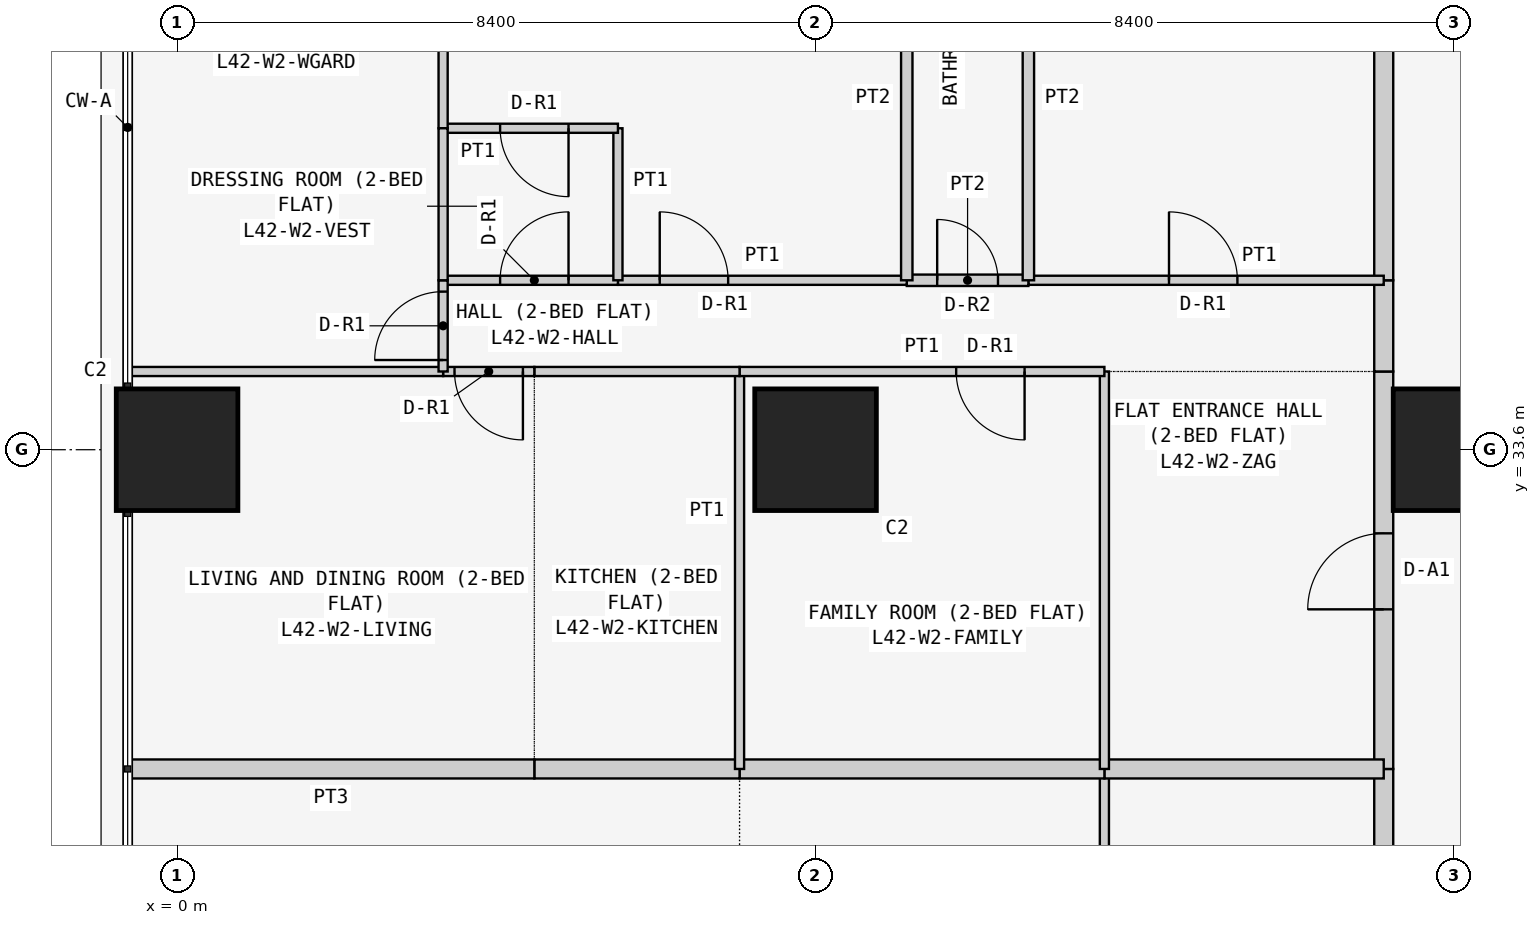
"""IFC4 building model, lengths in metres.
Left out: names, types, materials, properties, quantities, classifications, styles, units other than length and angle.
Written with IfcOpenShell. Run it as: python <this file> out.ifc"""

import sys

from ifc_helpers import new_model, si_unit, direction, frame, frame_2d, origin, origin_2d, place, context, subcontext, project, spatial, rectangle, extrude, element, fill, save


model = new_model("IFC4")
c1 = context("Model", 3, precision=1e-05, world=origin(), true_north=direction((0.0, 1.0)))
c2 = subcontext(c1, "Body", "Model", "MODEL_VIEW")
j1 = project(units=[si_unit("LENGTHUNIT", "METRE"), si_unit("PLANEANGLEUNIT", "RADIAN")], contexts=[c1])
p1 = place(None, origin())
s1 = spatial("IfcSite", under=j1, at=p1, CompositionType="ELEMENT")
p2 = place(p1, origin())
s2 = spatial("IfcBuilding", under=s1, at=p2, CompositionType="ELEMENT")
p3 = place(p2, frame((0.0, 0.0, 162.9)))
s3 = spatial("IfcBuildingStorey", under=s2, at=p3, CompositionType="ELEMENT", Elevation=162.9)
for number, where, z_axis, x_axis in (
    (1, (0.0, 33.6, 0.0), (0.0, 0.0, 1.0), (1.0, 0.0, 0.0)),
    (2, (8.4, 33.6, 0.0), (0.0, 0.0, 1.0), (1.0, 0.0, 0.0)),
    (3, (16.8, 33.6, 0.0), (0.0, 0.0, 1.0), (1.0, 0.0, 0.0)),
):
    element("IfcColumn", number, at=place(p3, frame(where, z_axis=z_axis, x_axis=x_axis)), inside=s3, PredefinedType="COLUMN", context=c2, shape_type="SweptSolid", body=[
        extrude(rectangle(XDim=1.6, YDim=1.6, at=origin_2d()), origin(), (0.0, 0.0, 1.0), 3.6),
    ])
p4 = place(p3, frame((15.875, 24.171, 0.0), z_axis=(0.0, 0.0, 1.0), x_axis=(0.0, 1.0, 0.0)))
e4 = element("IfcWall", 4, at=p4, inside=s3, PredefinedType="PARTITIONING", context=c2, shape_type="SweptSolid", body=[
    extrude(rectangle(XDim=5.229, YDim=0.25, at=frame_2d((2.615, 0.0))), origin(), (0.0, 0.0, 1.0), 3.45),
])
p5 = place(p4, frame((2.129, 0.0, 0.0)))
e5 = element("IfcOpeningElement", 5, at=p5, cuts=e4, PredefinedType="OPENING", context=c2, shape_type="SweptSolid", body=[
    extrude(rectangle(XDim=1.0, YDim=2.1, at=frame_2d((0.5, 1.05))), frame((0.0, 0.135, 0.0), z_axis=(0.0, -1.0, 0.0), x_axis=(1.0, 0.0, 0.0)), (0.0, 0.0, 1.0), 0.27),
])
p6 = place(p3, frame((15.875, 29.4, 0.0), z_axis=(0.0, 0.0, 1.0), x_axis=(0.0, 1.0, 0.0)))
e6 = element("IfcWall", 6, at=p6, inside=s3, PredefinedType="PARTITIONING", context=c2, shape_type="SweptSolid", body=[
    extrude(rectangle(XDim=5.229, YDim=0.25, at=frame_2d((2.615, 0.0))), origin(), (0.0, 0.0, 1.0), 3.45),
])
p7 = place(p6, frame((2.1, 0.0, 0.0)))
e7 = element("IfcOpeningElement", 7, at=p7, cuts=e6, PredefinedType="OPENING", context=c2, shape_type="SweptSolid", body=[
    extrude(rectangle(XDim=1.0, YDim=2.1, at=frame_2d((0.5, 1.05))), frame((0.0, 0.135, 0.0), z_axis=(0.0, -1.0, 0.0), x_axis=(1.0, 0.0, 0.0)), (0.0, 0.0, 1.0), 0.27),
])
p8 = place(p3, frame((15.875, 34.629, 0.0), z_axis=(0.0, 0.0, 1.0), x_axis=(0.0, 1.0, 0.0)))
e8 = element("IfcWall", 8, at=p8, inside=s3, PredefinedType="PARTITIONING", context=c2, shape_type="SweptSolid", body=[
    extrude(rectangle(XDim=1.2, YDim=0.25, at=frame_2d((0.6, 0.0))), origin(), (0.0, 0.0, 1.0), 3.45),
])
p9 = place(p3, frame((15.875, 35.829, 0.0), z_axis=(0.0, 0.0, 1.0), x_axis=(0.0, 1.0, 0.0)))
e9 = element("IfcWall", 9, at=p9, inside=s3, PredefinedType="PARTITIONING", context=c2, shape_type="SweptSolid", body=[
    extrude(rectangle(XDim=6.871, YDim=0.25, at=frame_2d((3.436, 0.0))), origin(), (0.0, 0.0, 1.0), 3.45),
])
p10 = place(p3, frame((12.2, 29.4, 0.0), z_axis=(0.0, 0.0, 1.0), x_axis=(0.0, -1.0, 0.0)))
e10 = element("IfcWall", 10, at=p10, inside=s3, PredefinedType="PARTITIONING", context=c2, shape_type="SweptSolid", body=[
    extrude(rectangle(XDim=5.229, YDim=0.12, at=frame_2d((2.615, 0.0))), origin(), (0.0, 0.0, 1.0), 3.45),
])
p11 = place(p10, frame((1.05, 0.0, 0.0)))
e11 = element("IfcOpeningElement", 11, at=p11, cuts=e10, PredefinedType="OPENING", context=c2, shape_type="SweptSolid", body=[
    extrude(rectangle(XDim=0.9, YDim=2.1, at=frame_2d((0.45, 1.05))), frame((0.0, 0.07, 0.0), z_axis=(0.0, -1.0, 0.0), x_axis=(1.0, 0.0, 0.0)), (0.0, 0.0, 1.0), 0.14),
])
p12 = place(p3, frame((15.875, 29.4, 0.0), z_axis=(0.0, 0.0, 1.0), x_axis=(-1.0, 0.0, 0.0)))
e12 = element("IfcWall", 12, at=p12, inside=s3, PredefinedType="PARTITIONING", context=c2, shape_type="SweptSolid", body=[
    extrude(rectangle(XDim=3.675, YDim=0.25, at=frame_2d((1.837, 0.0))), origin(), (0.0, 0.0, 1.0), 3.45),
])
p13 = place(p3, frame((12.2, 29.4, 0.0), z_axis=(0.0, 0.0, 1.0), x_axis=(-1.0, 0.0, 0.0)))
e13 = element("IfcWall", 13, at=p13, inside=s3, PredefinedType="PARTITIONING", context=c2, shape_type="SweptSolid", body=[
    extrude(rectangle(XDim=4.8, YDim=0.25, at=frame_2d((2.4, 0.0))), origin(), (0.0, 0.0, 1.0), 3.45),
])
p14 = place(p3, frame((7.4, 29.4, 0.0), z_axis=(0.0, 0.0, 1.0), x_axis=(-1.0, 0.0, 0.0)))
e14 = element("IfcWall", 14, at=p14, inside=s3, PredefinedType="PARTITIONING", context=c2, shape_type="SweptSolid", body=[
    extrude(rectangle(XDim=2.7, YDim=0.25, at=frame_2d((1.35, 0.0))), origin(), (0.0, 0.0, 1.0), 3.45),
])
p15 = place(p3, frame((4.7, 29.4, 0.0), z_axis=(0.0, 0.0, 1.0), x_axis=(-1.0, 0.0, 0.0)))
e15 = element("IfcWall", 15, at=p15, inside=s3, PredefinedType="PARTITIONING", context=c2, shape_type="SweptSolid", body=[
    extrude(rectangle(XDim=5.35, YDim=0.25, at=frame_2d((2.675, 0.0))), origin(), (0.0, 0.0, 1.0), 3.45),
])
for number, where, z_axis, x_axis in (
    (16, (12.2, 29.4, 0.0), (0.0, 0.0, 1.0), (0.0, 1.0, 0.0)),
    (17, (7.4, 29.4, 0.0), (0.0, 0.0, 1.0), (0.0, 1.0, 0.0)),
):
    element("IfcWall", number, at=place(p3, frame(where, z_axis=z_axis, x_axis=x_axis)), inside=s3, PredefinedType="PARTITIONING", context=c2, shape_type="SweptSolid", body=[
        extrude(rectangle(XDim=5.229, YDim=0.12, at=frame_2d((2.615, 0.0))), origin(), (0.0, 0.0, 1.0), 3.45),
    ])
p16 = place(p3, frame((7.4, 34.629, 0.0), z_axis=(0.0, 0.0, 1.0), x_axis=(1.0, 0.0, 0.0)))
e18 = element("IfcWall", 18, at=p16, inside=s3, PredefinedType="PARTITIONING", context=c2, shape_type="SweptSolid", body=[
    extrude(rectangle(XDim=4.8, YDim=0.12, at=frame_2d((2.4, 0.0))), origin(), (0.0, 0.0, 1.0), 3.45),
])
p17 = place(p16, frame((2.85, 0.0, 0.0)))
e19 = element("IfcOpeningElement", 19, at=p17, cuts=e18, PredefinedType="OPENING", context=c2, shape_type="SweptSolid", body=[
    extrude(rectangle(XDim=0.9, YDim=2.1, at=frame_2d((0.45, 1.05))), frame((0.0, 0.07, 0.0), z_axis=(0.0, -1.0, 0.0), x_axis=(1.0, 0.0, 0.0)), (0.0, 0.0, 1.0), 0.14),
])
p18 = place(p3, frame((4.7, 34.629, 0.0), z_axis=(0.0, 0.0, 1.0), x_axis=(1.0, 0.0, 0.0)))
e20 = element("IfcWall", 20, at=p18, inside=s3, PredefinedType="PARTITIONING", context=c2, shape_type="SweptSolid", body=[
    extrude(rectangle(XDim=2.7, YDim=0.12, at=frame_2d((1.35, 0.0))), origin(), (0.0, 0.0, 1.0), 3.45),
])
p19 = place(p3, frame((3.5, 34.629, 0.0), z_axis=(0.0, 0.0, 1.0), x_axis=(1.0, 0.0, 0.0)))
e21 = element("IfcWall", 21, at=p19, inside=s3, PredefinedType="PARTITIONING", context=c2, shape_type="SweptSolid", body=[
    extrude(rectangle(XDim=1.2, YDim=0.12, at=frame_2d((0.6, 0.0))), origin(), (0.0, 0.0, 1.0), 3.45),
])
p20 = place(p19, frame((0.15, 0.0, 0.0)))
e22 = element("IfcOpeningElement", 22, at=p20, cuts=e21, PredefinedType="OPENING", context=c2, shape_type="SweptSolid", body=[
    extrude(rectangle(XDim=0.9, YDim=2.1, at=frame_2d((0.45, 1.05))), frame((0.0, 0.07, 0.0), z_axis=(0.0, -1.0, 0.0), x_axis=(1.0, 0.0, 0.0)), (0.0, 0.0, 1.0), 0.14),
])
p21 = place(p3, frame((-0.65, 34.629, 0.0), z_axis=(0.0, 0.0, 1.0), x_axis=(1.0, 0.0, 0.0)))
e23 = element("IfcWall", 23, at=p21, inside=s3, PredefinedType="PARTITIONING", context=c2, shape_type="SweptSolid", body=[
    extrude(rectangle(XDim=4.15, YDim=0.12, at=frame_2d((2.075, 0.0))), origin(), (0.0, 0.0, 1.0), 3.45),
])
p22 = place(p3, frame((11.2, 35.829, 0.0), z_axis=(0.0, 0.0, 1.0), x_axis=(1.0, 0.0, 0.0)))
e24 = element("IfcWall", 24, at=p22, inside=s3, PredefinedType="PARTITIONING", context=c2, shape_type="SweptSolid", body=[
    extrude(rectangle(XDim=4.675, YDim=0.12, at=frame_2d((2.337, 0.0))), origin(), (0.0, 0.0, 1.0), 3.45),
])
p23 = place(p22, frame((1.85, 0.0, 0.0)))
e25 = element("IfcOpeningElement", 25, at=p23, cuts=e24, PredefinedType="OPENING", context=c2, shape_type="SweptSolid", body=[
    extrude(rectangle(XDim=0.9, YDim=2.1, at=frame_2d((0.45, 1.05))), frame((0.0, 0.07, 0.0), z_axis=(0.0, -1.0, 0.0), x_axis=(1.0, 0.0, 0.0)), (0.0, 0.0, 1.0), 0.14),
])
p24 = place(p3, frame((9.6, 35.829, 0.0), z_axis=(0.0, 0.0, 1.0), x_axis=(1.0, 0.0, 0.0)))
e26 = element("IfcWall", 26, at=p24, inside=s3, PredefinedType="PARTITIONING", context=c2, shape_type="SweptSolid", body=[
    extrude(rectangle(XDim=1.6, YDim=0.15, at=frame_2d((0.8, 0.0))), origin(), (0.0, 0.0, 1.0), 3.45),
])
p25 = place(p24, frame((0.4, 0.0, 0.0)))
e27 = element("IfcOpeningElement", 27, at=p25, cuts=e26, PredefinedType="OPENING", context=c2, shape_type="SweptSolid", body=[
    extrude(rectangle(XDim=0.8, YDim=2.1, at=frame_2d((0.4, 1.05))), frame((0.0, 0.085, 0.0), z_axis=(0.0, -1.0, 0.0), x_axis=(1.0, 0.0, 0.0)), (0.0, 0.0, 1.0), 0.17),
])
p26 = place(p3, frame((5.8, 35.829, 0.0), z_axis=(0.0, 0.0, 1.0), x_axis=(1.0, 0.0, 0.0)))
e28 = element("IfcWall", 28, at=p26, inside=s3, PredefinedType="PARTITIONING", context=c2, shape_type="SweptSolid", body=[
    extrude(rectangle(XDim=3.8, YDim=0.12, at=frame_2d((1.9, 0.0))), origin(), (0.0, 0.0, 1.0), 3.45),
])
p27 = place(p26, frame((0.55, 0.0, 0.0)))
e29 = element("IfcOpeningElement", 29, at=p27, cuts=e28, PredefinedType="OPENING", context=c2, shape_type="SweptSolid", body=[
    extrude(rectangle(XDim=0.9, YDim=2.1, at=frame_2d((0.45, 1.05))), frame((0.0, 0.07, 0.0), z_axis=(0.0, -1.0, 0.0), x_axis=(1.0, 0.0, 0.0)), (0.0, 0.0, 1.0), 0.14),
])
p28 = place(p3, frame((3.5, 35.829, 0.0), z_axis=(0.0, 0.0, 1.0), x_axis=(1.0, 0.0, 0.0)))
e30 = element("IfcWall", 30, at=p28, inside=s3, PredefinedType="PARTITIONING", context=c2, shape_type="SweptSolid", body=[
    extrude(rectangle(XDim=2.3, YDim=0.12, at=frame_2d((1.15, 0.0))), origin(), (0.0, 0.0, 1.0), 3.45),
])
p29 = place(p28, frame((0.75, 0.0, 0.0)))
e31 = element("IfcOpeningElement", 31, at=p29, cuts=e30, PredefinedType="OPENING", context=c2, shape_type="SweptSolid", body=[
    extrude(rectangle(XDim=0.9, YDim=2.1, at=frame_2d((0.45, 1.05))), frame((0.0, 0.07, 0.0), z_axis=(0.0, -1.0, 0.0), x_axis=(1.0, 0.0, 0.0)), (0.0, 0.0, 1.0), 0.14),
])
p30 = place(p3, frame((3.5, 34.629, 0.0), z_axis=(0.0, 0.0, 1.0), x_axis=(0.0, 1.0, 0.0)))
e32 = element("IfcWall", 32, at=p30, inside=s3, PredefinedType="PARTITIONING", context=c2, shape_type="SweptSolid", body=[
    extrude(rectangle(XDim=1.2, YDim=0.12, at=frame_2d((0.6, 0.0))), origin(), (0.0, 0.0, 1.0), 3.45),
])
p31 = place(p30, frame((0.151, 0.0, 0.0)))
e33 = element("IfcOpeningElement", 33, at=p31, cuts=e32, PredefinedType="OPENING", context=c2, shape_type="SweptSolid", body=[
    extrude(rectangle(XDim=0.9, YDim=2.1, at=frame_2d((0.45, 1.05))), frame((0.0, 0.07, 0.0), z_axis=(0.0, -1.0, 0.0), x_axis=(1.0, 0.0, 0.0)), (0.0, 0.0, 1.0), 0.14),
])
for number, where, z_axis, x_axis in (
    (34, (11.2, 35.829, 0.0), (0.0, 0.0, 1.0), (0.0, 1.0, 0.0)),
    (35, (9.6, 35.829, 0.0), (0.0, 0.0, 1.0), (0.0, 1.0, 0.0)),
):
    element("IfcWall", number, at=place(p3, frame(where, z_axis=z_axis, x_axis=x_axis)), inside=s3, PredefinedType="PARTITIONING", context=c2, shape_type="SweptSolid", body=[
        extrude(rectangle(XDim=6.871, YDim=0.15, at=frame_2d((3.436, 0.0))), origin(), (0.0, 0.0, 1.0), 3.45),
    ])
p32 = place(p3, frame((5.8, 35.829, 0.0), z_axis=(0.0, 0.0, 1.0), x_axis=(0.0, 1.0, 0.0)))
e36 = element("IfcWall", 36, at=p32, inside=s3, PredefinedType="PARTITIONING", context=c2, shape_type="SweptSolid", body=[
    extrude(rectangle(XDim=2.0, YDim=0.12, at=frame_2d((1.0, 0.0))), origin(), (0.0, 0.0, 1.0), 3.45),
])
p33 = place(p3, frame((5.8, 37.829, 0.0), z_axis=(0.0, 0.0, 1.0), x_axis=(-1.0, 0.0, 0.0)))
e37 = element("IfcWall", 37, at=p33, inside=s3, PredefinedType="PARTITIONING", context=c2, shape_type="SweptSolid", body=[
    extrude(rectangle(XDim=2.3, YDim=0.12, at=frame_2d((1.15, 0.0))), origin(), (0.0, 0.0, 1.0), 3.45),
])
p34 = place(p33, frame((0.65, 0.0, 0.0)))
e38 = element("IfcOpeningElement", 38, at=p34, cuts=e37, PredefinedType="OPENING", context=c2, shape_type="SweptSolid", body=[
    extrude(rectangle(XDim=0.9, YDim=2.1, at=frame_2d((0.45, 1.05))), frame((0.0, 0.07, 0.0), z_axis=(0.0, -1.0, 0.0), x_axis=(1.0, 0.0, 0.0)), (0.0, 0.0, 1.0), 0.14),
])
p35 = place(p3, frame((3.5, 37.829, 0.0), z_axis=(0.0, 0.0, 1.0), x_axis=(0.0, 1.0, 0.0)))
e39 = element("IfcWall", 39, at=p35, inside=s3, PredefinedType="PARTITIONING", context=c2, shape_type="SweptSolid", body=[
    extrude(rectangle(XDim=4.871, YDim=0.12, at=frame_2d((2.436, 0.0))), origin(), (0.0, 0.0, 1.0), 3.45),
])
p36 = place(p3, frame((3.5, 35.829, 0.0), z_axis=(0.0, 0.0, 1.0), x_axis=(0.0, 1.0, 0.0)))
e40 = element("IfcWall", 40, at=p36, inside=s3, PredefinedType="PARTITIONING", context=c2, shape_type="SweptSolid", body=[
    extrude(rectangle(XDim=2.0, YDim=0.12, at=frame_2d((1.0, 0.0))), origin(), (0.0, 0.0, 1.0), 3.45),
])
p37 = place(p7, origin())
e41 = element("IfcDoor", 41, at=p37, inside=s3, OperationType="SINGLE_SWING_LEFT", PredefinedType="DOOR", context=c2, shape_type="SweptSolid", body=[
    extrude(rectangle(XDim=1.0, YDim=2.1, at=frame_2d((0.5, 1.05))), frame((0.0, 0.025, 0.0), z_axis=(0.0, -1.0, 0.0), x_axis=(1.0, 0.0, 0.0)), (0.0, 0.0, 1.0), 0.05),
])
fill(e7, e41)
p38 = place(p17, frame((0.9, 0.0, 0.0), z_axis=(0.0, 0.0, 1.0), x_axis=(-1.0, 0.0, 0.0)))
e42 = element("IfcDoor", 42, at=p38, inside=s3, OperationType="SINGLE_SWING_LEFT", PredefinedType="DOOR", context=c2, shape_type="SweptSolid", body=[
    extrude(rectangle(XDim=0.9, YDim=2.1, at=frame_2d((0.45, 1.05))), frame((0.0, 0.025, 0.0), z_axis=(0.0, -1.0, 0.0), x_axis=(1.0, 0.0, 0.0)), (0.0, 0.0, 1.0), 0.05),
])
fill(e19, e42)
p39 = place(p20, frame((0.9, 0.0, 0.0), z_axis=(0.0, 0.0, 1.0), x_axis=(-1.0, 0.0, 0.0)))
e43 = element("IfcDoor", 43, at=p39, inside=s3, OperationType="SINGLE_SWING_LEFT", PredefinedType="DOOR", context=c2, shape_type="SweptSolid", body=[
    extrude(rectangle(XDim=0.9, YDim=2.1, at=frame_2d((0.45, 1.05))), frame((0.0, 0.025, 0.0), z_axis=(0.0, -1.0, 0.0), x_axis=(1.0, 0.0, 0.0)), (0.0, 0.0, 1.0), 0.05),
])
fill(e22, e43)
p40 = place(p23, origin())
e44 = element("IfcDoor", 44, at=p40, inside=s3, OperationType="SINGLE_SWING_LEFT", PredefinedType="DOOR", context=c2, shape_type="SweptSolid", body=[
    extrude(rectangle(XDim=0.9, YDim=2.1, at=frame_2d((0.45, 1.05))), frame((0.0, 0.025, 0.0), z_axis=(0.0, -1.0, 0.0), x_axis=(1.0, 0.0, 0.0)), (0.0, 0.0, 1.0), 0.05),
])
fill(e25, e44)
p41 = place(p25, origin())
e45 = element("IfcDoor", 45, at=p41, inside=s3, OperationType="SINGLE_SWING_LEFT", PredefinedType="DOOR", context=c2, shape_type="SweptSolid", body=[
    extrude(rectangle(XDim=0.8, YDim=2.1, at=frame_2d((0.4, 1.05))), frame((0.0, 0.025, 0.0), z_axis=(0.0, -1.0, 0.0), x_axis=(1.0, 0.0, 0.0)), (0.0, 0.0, 1.0), 0.05),
])
fill(e27, e45)
p42 = place(p27, origin())
e46 = element("IfcDoor", 46, at=p42, inside=s3, OperationType="SINGLE_SWING_LEFT", PredefinedType="DOOR", context=c2, shape_type="SweptSolid", body=[
    extrude(rectangle(XDim=0.9, YDim=2.1, at=frame_2d((0.45, 1.05))), frame((0.0, 0.025, 0.0), z_axis=(0.0, -1.0, 0.0), x_axis=(1.0, 0.0, 0.0)), (0.0, 0.0, 1.0), 0.05),
])
fill(e29, e46)
p43 = place(p29, origin())
e47 = element("IfcDoor", 47, at=p43, inside=s3, OperationType="SINGLE_SWING_RIGHT", PredefinedType="DOOR", context=c2, shape_type="SweptSolid", body=[
    extrude(rectangle(XDim=0.9, YDim=2.1, at=frame_2d((0.45, 1.05))), frame((0.0, 0.025, 0.0), z_axis=(0.0, -1.0, 0.0), x_axis=(1.0, 0.0, 0.0)), (0.0, 0.0, 1.0), 0.05),
])
fill(e31, e47)
p44 = place(p34, origin())
e48 = element("IfcDoor", 48, at=p44, inside=s3, OperationType="SINGLE_SWING_LEFT", PredefinedType="DOOR", context=c2, shape_type="SweptSolid", body=[
    extrude(rectangle(XDim=0.9, YDim=2.1, at=frame_2d((0.45, 1.05))), frame((0.0, 0.025, 0.0), z_axis=(0.0, -1.0, 0.0), x_axis=(1.0, 0.0, 0.0)), (0.0, 0.0, 1.0), 0.05),
])
fill(e38, e48)
p45 = place(p31, origin())
e49 = element("IfcDoor", 49, at=p45, inside=s3, OperationType="SINGLE_SWING_LEFT", PredefinedType="DOOR", context=c2, shape_type="SweptSolid", body=[
    extrude(rectangle(XDim=0.9, YDim=2.1, at=frame_2d((0.45, 1.05))), frame((0.0, 0.025, 0.0), z_axis=(0.0, -1.0, 0.0), x_axis=(1.0, 0.0, 0.0)), (0.0, 0.0, 1.0), 0.05),
])
fill(e33, e49)
save(model, sys.argv[1])
